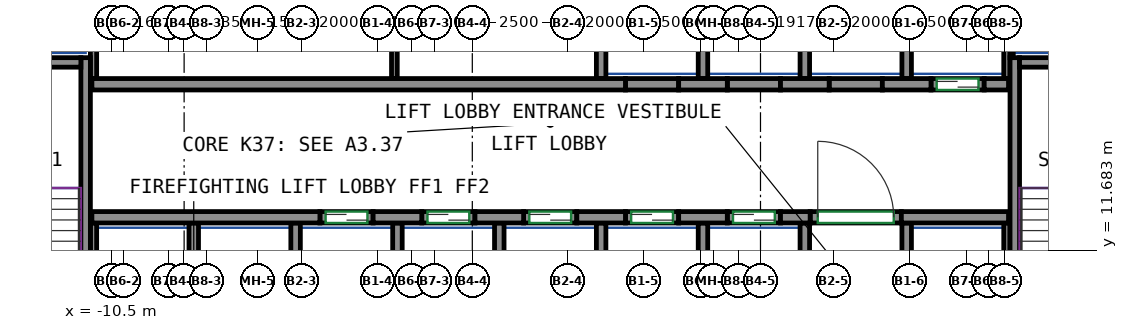
"""IFC4 building model, lengths in metres.
Left out: names, types, materials, properties, quantities, classifications, styles, units other than length and angle.
Written with IfcOpenShell. Run it as: python <this file> out.ifc"""

import sys

from ifc_helpers import new_model, si_unit, direction, frame, frame_2d, origin, place, context, subcontext, project, spatial, rectangle, extrude, source, transform, mapped, element, fill, save


model = new_model("IFC4")
c1 = context("Model", 3, precision=1e-05, world=origin(), true_north=direction((0.0, 1.0)))
c2 = subcontext(c1, "Body", "Model", "MODEL_VIEW")
j1 = project(units=[si_unit("LENGTHUNIT", "METRE"), si_unit("PLANEANGLEUNIT", "RADIAN")], contexts=[c1])
p1 = place(None, origin())
s1 = spatial("IfcSite", under=j1, at=p1, CompositionType="ELEMENT")
p2 = place(p1, origin())
s2 = spatial("IfcBuilding", under=s1, at=p2, CompositionType="ELEMENT")
p3 = place(p2, frame((0.0, 0.0, 157.5)))
s3 = spatial("IfcBuildingStorey", under=s2, at=p3, CompositionType="ELEMENT", Elevation=157.5)
m1 = source(origin(), c2, "Body", "SweptSolid", [
    extrude(rectangle(XDim=7.75, YDim=0.25, at=frame_2d((3.875, 0.0))), origin(), (0.0, 0.0, 1.0), 3.12),
])
p4 = place(p3, frame((-11.175, 9.0, 0.0), z_axis=(0.0, 0.0, 1.0), x_axis=(0.0, 1.0, 0.0)))
e1 = element("IfcWall", 1, at=p4, inside=s3, PredefinedType="SHEAR", context=c2, shape_type="MappedRepresentation", body=[
    mapped(m1, transform((0.0, 0.0, 0.0))),
])
m2 = source(origin(), c2, "Body", "SweptSolid", [
    extrude(rectangle(XDim=3.7, YDim=0.25, at=frame_2d((1.85, 0.0))), origin(), (0.0, 0.0, 1.0), 3.12),
])
p5 = place(p3, frame((-15.0, 16.625, 0.0), z_axis=(0.0, 0.0, 1.0), x_axis=(1.0, 0.0, 0.0)))
e2 = element("IfcWall", 2, at=p5, inside=s3, PredefinedType="SHEAR", context=c2, shape_type="MappedRepresentation", body=[
    mapped(m2, transform((0.0, 0.0, 0.0))),
])
p6 = place(p3, frame((13.275, 9.0, 0.0), z_axis=(0.0, 0.0, 1.0), x_axis=(0.0, 1.0, 0.0)))
e3 = element("IfcWall", 3, at=p6, inside=s3, PredefinedType="SHEAR", context=c2, shape_type="MappedRepresentation", body=[
    mapped(m1, transform((0.0, 0.0, 0.0))),
])
m3 = source(origin(), c2, "Body", "SweptSolid", [
    extrude(rectangle(XDim=3.7, YDim=0.25, at=frame_2d((1.85, 0.0))), origin(), (0.0, 0.0, 1.0), 3.12),
])
p7 = place(p3, frame((13.4, 16.625, 0.0), z_axis=(0.0, 0.0, 1.0), x_axis=(1.0, 0.0, 0.0)))
e4 = element("IfcWall", 4, at=p7, inside=s3, PredefinedType="SHEAR", context=c2, shape_type="MappedRepresentation", body=[
    mapped(m3, transform((0.0, 0.0, 0.0))),
])
m4 = source(origin(), c2, "Body", "SweptSolid", [
    extrude(rectangle(XDim=6.0, YDim=0.3, at=frame_2d((3.0, 0.0))), origin(), (0.0, 0.0, 1.0), 3.12),
])
p8 = place(p3, frame((-11.01, 12.55, 0.0), z_axis=(0.0, 0.0, 1.0), x_axis=(1.0, 0.0, 0.0)))
e5 = element("IfcWall", 5, at=p8, inside=s3, PredefinedType="SHEAR", context=c2, shape_type="MappedRepresentation", body=[
    mapped(m4, transform((0.0, 0.0, 0.0))),
])
m5 = source(origin(), c2, "Body", "SweptSolid", [
    extrude(rectangle(XDim=1.28, YDim=0.3, at=frame_2d((0.64, 0.0))), origin(), (0.0, 0.0, 1.0), 3.12),
])
for number, where, z_axis, x_axis in (
    (6, (-3.61, 12.55, 0.0), (0.0, 0.0, 1.0), (1.0, 0.0, 0.0)),
    (7, (-0.93, 12.55, 0.0), (0.0, 0.0, 1.0), (1.0, 0.0, 0.0)),
    (8, (1.75, 12.55, 0.0), (0.0, 0.0, 1.0), (1.0, 0.0, 0.0)),
    (9, (4.43, 12.55, 0.0), (0.0, 0.0, 1.0), (1.0, 0.0, 0.0)),
):
    element("IfcWall", number, at=place(p3, frame(where, z_axis=z_axis, x_axis=x_axis)), inside=s3, PredefinedType="SHEAR", context=c2, shape_type="MappedRepresentation", body=[
        mapped(m5, transform((0.0, 0.0, 0.0))),
    ])
m6 = source(origin(), c2, "Body", "SweptSolid", [
    extrude(rectangle(XDim=0.78, YDim=0.3, at=frame_2d((0.39, 0.0))), origin(), (0.0, 0.0, 1.0), 3.12),
])
p9 = place(p3, frame((7.11, 12.55, 0.0), z_axis=(0.0, 0.0, 1.0), x_axis=(1.0, 0.0, 0.0)))
e10 = element("IfcWall", 10, at=p9, inside=s3, PredefinedType="SHEAR", context=c2, shape_type="MappedRepresentation", body=[
    mapped(m6, transform((0.0, 0.0, 0.0))),
])
m7 = source(origin(), c2, "Body", "SweptSolid", [
    extrude(rectangle(XDim=2.82, YDim=0.3, at=frame_2d((1.41, 0.0))), origin(), (0.0, 0.0, 1.0), 3.12),
])
p10 = place(p3, frame((10.29, 12.55, 0.0), z_axis=(0.0, 0.0, 1.0), x_axis=(1.0, 0.0, 0.0)))
e11 = element("IfcWall", 11, at=p10, inside=s3, PredefinedType="SHEAR", context=c2, shape_type="MappedRepresentation", body=[
    mapped(m7, transform((0.0, 0.0, 0.0))),
])
m8 = source(origin(), c2, "Body", "SweptSolid", [
    extrude(rectangle(XDim=14.04, YDim=0.3, at=frame_2d((7.02, 0.0))), origin(), (0.0, 0.0, 1.0), 3.12),
])
p11 = place(p3, frame((-11.01, 16.05, 0.0), z_axis=(0.0, 0.0, 1.0), x_axis=(1.0, 0.0, 0.0)))
e12 = element("IfcWall", 12, at=p11, inside=s3, PredefinedType="SHEAR", context=c2, shape_type="MappedRepresentation", body=[
    mapped(m8, transform((0.0, 0.0, 0.0))),
])
p12 = place(p3, frame((4.43, 16.05, 0.0), z_axis=(0.0, 0.0, 1.0), x_axis=(1.0, 0.0, 0.0)))
e13 = element("IfcWall", 13, at=p12, inside=s3, PredefinedType="SHEAR", context=c2, shape_type="MappedRepresentation", body=[
    mapped(m5, transform((0.0, 0.0, 0.0))),
])
m9 = source(origin(), c2, "Body", "SweptSolid", [
    extrude(rectangle(XDim=1.28, YDim=0.3, at=frame_2d((0.64, 0.0))), origin(), (0.0, 0.0, 1.0), 3.12),
])
p13 = place(p3, frame((7.11, 16.05, 0.0), z_axis=(0.0, 0.0, 1.0), x_axis=(1.0, 0.0, 0.0)))
e14 = element("IfcWall", 14, at=p13, inside=s3, PredefinedType="SHEAR", context=c2, shape_type="MappedRepresentation", body=[
    mapped(m9, transform((0.0, 0.0, 0.0))),
])
p14 = place(p3, frame((9.79, 16.05, 0.0), z_axis=(0.0, 0.0, 1.0), x_axis=(1.0, 0.0, 0.0)))
e15 = element("IfcWall", 15, at=p14, inside=s3, PredefinedType="SHEAR", context=c2, shape_type="MappedRepresentation", body=[
    mapped(m5, transform((0.0, 0.0, 0.0))),
])
m10 = source(origin(), c2, "Body", "SweptSolid", [
    extrude(rectangle(XDim=0.64, YDim=0.3, at=frame_2d((0.32, 0.0))), origin(), (0.0, 0.0, 1.0), 3.12),
])
p15 = place(p3, frame((12.47, 16.05, 0.0), z_axis=(0.0, 0.0, 1.0), x_axis=(1.0, 0.0, 0.0)))
e16 = element("IfcWall", 16, at=p15, inside=s3, PredefinedType="SHEAR", context=c2, shape_type="MappedRepresentation", body=[
    mapped(m10, transform((0.0, 0.0, 0.0))),
])
m11 = source(origin(), c2, "Body", "SweptSolid", [
    extrude(rectangle(XDim=1.4, YDim=0.3, at=frame_2d((0.7, 0.0))), origin(), (0.0, 0.0, 1.0), 3.12),
])
p16 = place(p3, frame((-5.01, 12.55, 0.0), z_axis=(0.0, 0.0, 1.0), x_axis=(1.0, 0.0, 0.0)))
e17 = element("IfcWall", 17, at=p16, inside=s3, PredefinedType="PARTITIONING", context=c2, shape_type="MappedRepresentation", body=[
    mapped(m11, transform((0.0, 0.0, 0.0))),
])
p17 = place(p16, frame((0.15, 0.0, 0.0)))
e18 = element("IfcOpeningElement", 18, at=p17, cuts=e17, PredefinedType="OPENING", context=c2, shape_type="SweptSolid", body=[
    extrude(rectangle(XDim=1.1, YDim=2.1, at=frame_2d((0.55, 1.05))), frame((0.0, 0.16, 0.0), z_axis=(0.0, -1.0, 0.0), x_axis=(1.0, 0.0, 0.0)), (0.0, 0.0, 1.0), 0.32),
])
m12 = source(origin(), c2, "Body", "SweptSolid", [
    extrude(rectangle(XDim=1.4, YDim=0.3, at=frame_2d((0.7, 0.0))), origin(), (0.0, 0.0, 1.0), 3.12),
])
p18 = place(p3, frame((-2.33, 12.55, 0.0), z_axis=(0.0, 0.0, 1.0), x_axis=(1.0, 0.0, 0.0)))
e19 = element("IfcWall", 19, at=p18, inside=s3, PredefinedType="PARTITIONING", context=c2, shape_type="MappedRepresentation", body=[
    mapped(m12, transform((0.0, 0.0, 0.0))),
])
p19 = place(p18, frame((0.15, 0.0, 0.0)))
e20 = element("IfcOpeningElement", 20, at=p19, cuts=e19, PredefinedType="OPENING", context=c2, shape_type="SweptSolid", body=[
    extrude(rectangle(XDim=1.1, YDim=2.1, at=frame_2d((0.55, 1.05))), frame((0.0, 0.16, 0.0), z_axis=(0.0, -1.0, 0.0), x_axis=(1.0, 0.0, 0.0)), (0.0, 0.0, 1.0), 0.32),
])
p20 = place(p3, frame((0.35, 12.55, 0.0), z_axis=(0.0, 0.0, 1.0), x_axis=(1.0, 0.0, 0.0)))
e21 = element("IfcWall", 21, at=p20, inside=s3, PredefinedType="PARTITIONING", context=c2, shape_type="MappedRepresentation", body=[
    mapped(m11, transform((0.0, 0.0, 0.0))),
])
p21 = place(p20, frame((0.15, 0.0, 0.0)))
e22 = element("IfcOpeningElement", 22, at=p21, cuts=e21, PredefinedType="OPENING", context=c2, shape_type="SweptSolid", body=[
    extrude(rectangle(XDim=1.1, YDim=2.1, at=frame_2d((0.55, 1.05))), frame((0.0, 0.16, 0.0), z_axis=(0.0, -1.0, 0.0), x_axis=(1.0, 0.0, 0.0)), (0.0, 0.0, 1.0), 0.32),
])
p22 = place(p3, frame((3.03, 12.55, 0.0), z_axis=(0.0, 0.0, 1.0), x_axis=(1.0, 0.0, 0.0)))
e23 = element("IfcWall", 23, at=p22, inside=s3, PredefinedType="PARTITIONING", context=c2, shape_type="MappedRepresentation", body=[
    mapped(m11, transform((0.0, 0.0, 0.0))),
])
p23 = place(p22, frame((0.15, 0.0, 0.0)))
e24 = element("IfcOpeningElement", 24, at=p23, cuts=e23, PredefinedType="OPENING", context=c2, shape_type="SweptSolid", body=[
    extrude(rectangle(XDim=1.1, YDim=2.1, at=frame_2d((0.55, 1.05))), frame((0.0, 0.16, 0.0), z_axis=(0.0, -1.0, 0.0), x_axis=(1.0, 0.0, 0.0)), (0.0, 0.0, 1.0), 0.32),
])
p24 = place(p3, frame((5.71, 12.55, 0.0), z_axis=(0.0, 0.0, 1.0), x_axis=(1.0, 0.0, 0.0)))
e25 = element("IfcWall", 25, at=p24, inside=s3, PredefinedType="PARTITIONING", context=c2, shape_type="MappedRepresentation", body=[
    mapped(m12, transform((0.0, 0.0, 0.0))),
])
p25 = place(p24, frame((0.15, 0.0, 0.0)))
e26 = element("IfcOpeningElement", 26, at=p25, cuts=e25, PredefinedType="OPENING", context=c2, shape_type="SweptSolid", body=[
    extrude(rectangle(XDim=1.1, YDim=2.1, at=frame_2d((0.55, 1.05))), frame((0.0, 0.16, 0.0), z_axis=(0.0, -1.0, 0.0), x_axis=(1.0, 0.0, 0.0)), (0.0, 0.0, 1.0), 0.32),
])
p26 = place(p3, frame((11.07, 16.05, 0.0), z_axis=(0.0, 0.0, 1.0), x_axis=(1.0, 0.0, 0.0)))
e27 = element("IfcWall", 27, at=p26, inside=s3, PredefinedType="PARTITIONING", context=c2, shape_type="MappedRepresentation", body=[
    mapped(m11, transform((0.0, 0.0, 0.0))),
])
p27 = place(p26, frame((0.15, 0.0, 0.0)))
e28 = element("IfcOpeningElement", 28, at=p27, cuts=e27, PredefinedType="OPENING", context=c2, shape_type="SweptSolid", body=[
    extrude(rectangle(XDim=1.1, YDim=2.1, at=frame_2d((0.55, 1.05))), frame((0.0, 0.16, 0.0), z_axis=(0.0, -1.0, 0.0), x_axis=(1.0, 0.0, 0.0)), (0.0, 0.0, 1.0), 0.32),
])
m13 = source(origin(), c2, "Body", "SweptSolid", [
    extrude(rectangle(XDim=2.4, YDim=0.3, at=frame_2d((1.2, 0.0))), origin(), (0.0, 0.0, 1.0), 3.12),
])
p28 = place(p3, frame((7.89, 12.55, 0.0), z_axis=(0.0, 0.0, 1.0), x_axis=(1.0, 0.0, 0.0)))
e29 = element("IfcWall", 29, at=p28, inside=s3, PredefinedType="PARTITIONING", context=c2, shape_type="MappedRepresentation", body=[
    mapped(m13, transform((0.0, 0.0, 0.0))),
])
p29 = place(p28, frame((0.2, 0.0, 0.0)))
e30 = element("IfcOpeningElement", 30, at=p29, cuts=e29, PredefinedType="OPENING", context=c2, shape_type="SweptSolid", body=[
    extrude(rectangle(XDim=2.0, YDim=2.1, at=frame_2d((1.0, 1.05))), frame((0.0, 0.16, 0.0), z_axis=(0.0, -1.0, 0.0), x_axis=(1.0, 0.0, 0.0)), (0.0, 0.0, 1.0), 0.32),
])
p30 = place(p3, frame((3.03, 16.05, 0.0), z_axis=(0.0, 0.0, 1.0), x_axis=(1.0, 0.0, 0.0)))
e31 = element("IfcWall", 31, at=p30, inside=s3, PredefinedType="PARTITIONING", context=c2, shape_type="MappedRepresentation", body=[
    mapped(m11, transform((0.0, 0.0, 0.0))),
])
for number, where, z_axis, x_axis in (
    (32, (5.71, 16.05, 0.0), (0.0, 0.0, 1.0), (1.0, 0.0, 0.0)),
    (33, (8.39, 16.05, 0.0), (0.0, 0.0, 1.0), (1.0, 0.0, 0.0)),
):
    element("IfcWall", number, at=place(p3, frame(where, z_axis=z_axis, x_axis=x_axis)), inside=s3, PredefinedType="PARTITIONING", context=c2, shape_type="MappedRepresentation", body=[
        mapped(m12, transform((0.0, 0.0, 0.0))),
    ])
m14 = source(origin(), c2, "Body", "SweptSolid", [
    extrude(rectangle(XDim=3.275, YDim=0.165, at=frame_2d((1.638, 0.0))), origin(), (0.0, 0.0, 1.0), 3.12),
])
p31 = place(p3, frame((13.067, 16.2, 0.0), z_axis=(0.0, 0.0, 1.0), x_axis=(0.0, 1.0, 0.0)))
e34 = element("IfcWall", 34, at=p31, inside=s3, PredefinedType="PARTITIONING", context=c2, shape_type="MappedRepresentation", body=[
    mapped(m14, transform((0.0, 0.0, 0.0))),
])
m15 = source(origin(), c2, "Body", "SweptSolid", [
    extrude(rectangle(XDim=4.8, YDim=0.165, at=frame_2d((2.4, 0.0))), origin(), (0.0, 0.0, 1.0), 3.12),
])
p32 = place(p3, frame((-10.968, 16.2, 0.0), z_axis=(0.0, 0.0, 1.0), x_axis=(0.0, 1.0, 0.0)))
e35 = element("IfcWall", 35, at=p32, inside=s3, PredefinedType="PARTITIONING", context=c2, shape_type="MappedRepresentation", body=[
    mapped(m15, transform((0.0, 0.0, 0.0))),
])
m16 = source(origin(), c2, "Body", "SweptSolid", [
    extrude(rectangle(XDim=3.275, YDim=0.25, at=frame_2d((1.638, 0.0))), origin(), (0.0, 0.0, 1.0), 3.12),
])
p33 = place(p3, frame((10.43, 16.2, 0.0), z_axis=(0.0, 0.0, 1.0), x_axis=(0.0, 1.0, 0.0)))
e36 = element("IfcWall", 36, at=p33, inside=s3, PredefinedType="PARTITIONING", context=c2, shape_type="MappedRepresentation", body=[
    mapped(m16, transform((0.0, 0.0, 0.0))),
])
m17 = source(origin(), c2, "Body", "SweptSolid", [
    extrude(rectangle(XDim=2.725, YDim=0.085, at=frame_2d((1.363, 0.0))), origin(), (0.0, 0.0, 1.0), 3.12),
])
p34 = place(p3, frame((13.192, 16.75, 0.0), z_axis=(0.0, 0.0, 1.0), x_axis=(0.0, 1.0, 0.0)))
e37 = element("IfcWall", 37, at=p34, inside=s3, PredefinedType="PARTITIONING", context=c2, shape_type="MappedRepresentation", body=[
    mapped(m17, transform((0.0, 0.0, 0.0))),
])
for number, where, z_axis, x_axis in (
    (38, (2.39, 16.2, 0.0), (0.0, 0.0, 1.0), (0.0, 1.0, 0.0)),
    (39, (5.07, 16.2, 0.0), (0.0, 0.0, 1.0), (0.0, 1.0, 0.0)),
    (40, (7.75, 16.2, 0.0), (0.0, 0.0, 1.0), (0.0, 1.0, 0.0)),
):
    element("IfcWall", number, at=place(p3, frame(where, z_axis=z_axis, x_axis=x_axis)), inside=s3, PredefinedType="PARTITIONING", context=c2, shape_type="MappedRepresentation", body=[
        mapped(m16, transform((0.0, 0.0, 0.0))),
    ])
m18 = source(origin(), c2, "Body", "SweptSolid", [
    extrude(rectangle(XDim=3.4, YDim=0.25, at=frame_2d((1.7, 0.0))), origin(), (0.0, 0.0, 1.0), 3.12),
])
p35 = place(p3, frame((10.43, 9.0, 0.0), z_axis=(0.0, 0.0, 1.0), x_axis=(0.0, 1.0, 0.0)))
e41 = element("IfcWall", 41, at=p35, inside=s3, PredefinedType="PARTITIONING", context=c2, shape_type="MappedRepresentation", body=[
    mapped(m18, transform((0.0, 0.0, 0.0))),
])
m19 = source(origin(), c2, "Body", "SweptSolid", [
    extrude(rectangle(XDim=3.4, YDim=0.165, at=frame_2d((1.7, 0.0))), origin(), (0.0, 0.0, 1.0), 3.12),
])
p36 = place(p3, frame((13.067, 9.0, 0.0), z_axis=(0.0, 0.0, 1.0), x_axis=(0.0, 1.0, 0.0)))
e42 = element("IfcWall", 42, at=p36, inside=s3, PredefinedType="PARTITIONING", context=c2, shape_type="MappedRepresentation", body=[
    mapped(m19, transform((0.0, 0.0, 0.0))),
])
for number, where, z_axis, x_axis in (
    (43, (2.39, 9.0, 0.0), (0.0, 0.0, 1.0), (0.0, 1.0, 0.0)),
    (44, (5.07, 9.0, 0.0), (0.0, 0.0, 1.0), (0.0, 1.0, 0.0)),
    (45, (7.75, 9.0, 0.0), (0.0, 0.0, 1.0), (0.0, 1.0, 0.0)),
    (46, (-0.29, 9.0, 0.0), (0.0, 0.0, 1.0), (0.0, 1.0, 0.0)),
):
    element("IfcWall", number, at=place(p3, frame(where, z_axis=z_axis, x_axis=x_axis)), inside=s3, PredefinedType="PARTITIONING", context=c2, shape_type="MappedRepresentation", body=[
        mapped(m18, transform((0.0, 0.0, 0.0))),
    ])
p37 = place(p3, frame((-10.968, 9.0, 0.0), z_axis=(0.0, 0.0, 1.0), x_axis=(0.0, 1.0, 0.0)))
e47 = element("IfcWall", 47, at=p37, inside=s3, PredefinedType="PARTITIONING", context=c2, shape_type="MappedRepresentation", body=[
    mapped(m19, transform((0.0, 0.0, 0.0))),
])
for number, where, z_axis, x_axis in (
    (48, (-2.97, 9.0, 0.0), (0.0, 0.0, 1.0), (0.0, 1.0, 0.0)),
    (49, (-5.65, 9.0, 0.0), (0.0, 0.0, 1.0), (0.0, 1.0, 0.0)),
    (50, (-8.33, 9.0, 0.0), (0.0, 0.0, 1.0), (0.0, 1.0, 0.0)),
):
    element("IfcWall", number, at=place(p3, frame(where, z_axis=z_axis, x_axis=x_axis)), inside=s3, PredefinedType="PARTITIONING", context=c2, shape_type="MappedRepresentation", body=[
        mapped(m18, transform((0.0, 0.0, 0.0))),
    ])
m20 = source(origin(), c2, "Body", "SweptSolid", [
    extrude(rectangle(XDim=4.8, YDim=0.15, at=frame_2d((2.4, 0.0))), origin(), (0.0, 0.0, 1.0), 3.12),
])
p38 = place(p3, frame((-3.05, 16.2, 0.0), z_axis=(0.0, 0.0, 1.0), x_axis=(0.0, 1.0, 0.0)))
e51 = element("IfcWall", 51, at=p38, inside=s3, PredefinedType="PARTITIONING", context=c2, shape_type="MappedRepresentation", body=[
    mapped(m20, transform((0.0, 0.0, 0.0))),
])
p39 = place(p29, origin())
e52 = element("IfcDoor", 52, at=p39, inside=s3, OperationType="DOUBLE_DOOR_SINGLE_SWING", PredefinedType="DOOR", context=c2, shape_type="SweptSolid", body=[
    extrude(rectangle(XDim=2.0, YDim=2.1, at=frame_2d((1.0, 1.05))), frame((0.0, 0.025, 0.0), z_axis=(0.0, -1.0, 0.0), x_axis=(1.0, 0.0, 0.0)), (0.0, 0.0, 1.0), 0.05),
])
fill(e30, e52)
p40 = place(p17, origin())
e53 = element("IfcDoor", 53, at=p40, inside=s3, OperationType="DOUBLE_DOOR_SLIDING", PredefinedType="DOOR", context=c2, shape_type="SweptSolid", body=[
    extrude(rectangle(XDim=1.1, YDim=2.1, at=frame_2d((0.55, 1.05))), frame((0.0, 0.025, 0.0), z_axis=(0.0, -1.0, 0.0), x_axis=(1.0, 0.0, 0.0)), (0.0, 0.0, 1.0), 0.05),
])
fill(e18, e53)
p41 = place(p19, origin())
e54 = element("IfcDoor", 54, at=p41, inside=s3, OperationType="DOUBLE_DOOR_SLIDING", PredefinedType="DOOR", context=c2, shape_type="SweptSolid", body=[
    extrude(rectangle(XDim=1.1, YDim=2.1, at=frame_2d((0.55, 1.05))), frame((0.0, 0.025, 0.0), z_axis=(0.0, -1.0, 0.0), x_axis=(1.0, 0.0, 0.0)), (0.0, 0.0, 1.0), 0.05),
])
fill(e20, e54)
p42 = place(p21, origin())
e55 = element("IfcDoor", 55, at=p42, inside=s3, OperationType="DOUBLE_DOOR_SLIDING", PredefinedType="DOOR", context=c2, shape_type="SweptSolid", body=[
    extrude(rectangle(XDim=1.1, YDim=2.1, at=frame_2d((0.55, 1.05))), frame((0.0, 0.025, 0.0), z_axis=(0.0, -1.0, 0.0), x_axis=(1.0, 0.0, 0.0)), (0.0, 0.0, 1.0), 0.05),
])
fill(e22, e55)
p43 = place(p23, origin())
e56 = element("IfcDoor", 56, at=p43, inside=s3, OperationType="DOUBLE_DOOR_SLIDING", PredefinedType="DOOR", context=c2, shape_type="SweptSolid", body=[
    extrude(rectangle(XDim=1.1, YDim=2.1, at=frame_2d((0.55, 1.05))), frame((0.0, 0.025, 0.0), z_axis=(0.0, -1.0, 0.0), x_axis=(1.0, 0.0, 0.0)), (0.0, 0.0, 1.0), 0.05),
])
fill(e24, e56)
p44 = place(p25, origin())
e57 = element("IfcDoor", 57, at=p44, inside=s3, OperationType="DOUBLE_DOOR_SLIDING", PredefinedType="DOOR", context=c2, shape_type="SweptSolid", body=[
    extrude(rectangle(XDim=1.1, YDim=2.1, at=frame_2d((0.55, 1.05))), frame((0.0, 0.025, 0.0), z_axis=(0.0, -1.0, 0.0), x_axis=(1.0, 0.0, 0.0)), (0.0, 0.0, 1.0), 0.05),
])
fill(e26, e57)
p45 = place(p27, origin())
e58 = element("IfcDoor", 58, at=p45, inside=s3, OperationType="DOUBLE_DOOR_SLIDING", PredefinedType="DOOR", context=c2, shape_type="SweptSolid", body=[
    extrude(rectangle(XDim=1.1, YDim=2.1, at=frame_2d((0.55, 1.05))), frame((0.0, 0.025, 0.0), z_axis=(0.0, -1.0, 0.0), x_axis=(1.0, 0.0, 0.0)), (0.0, 0.0, 1.0), 0.05),
])
fill(e28, e58)
save(model, sys.argv[1])
